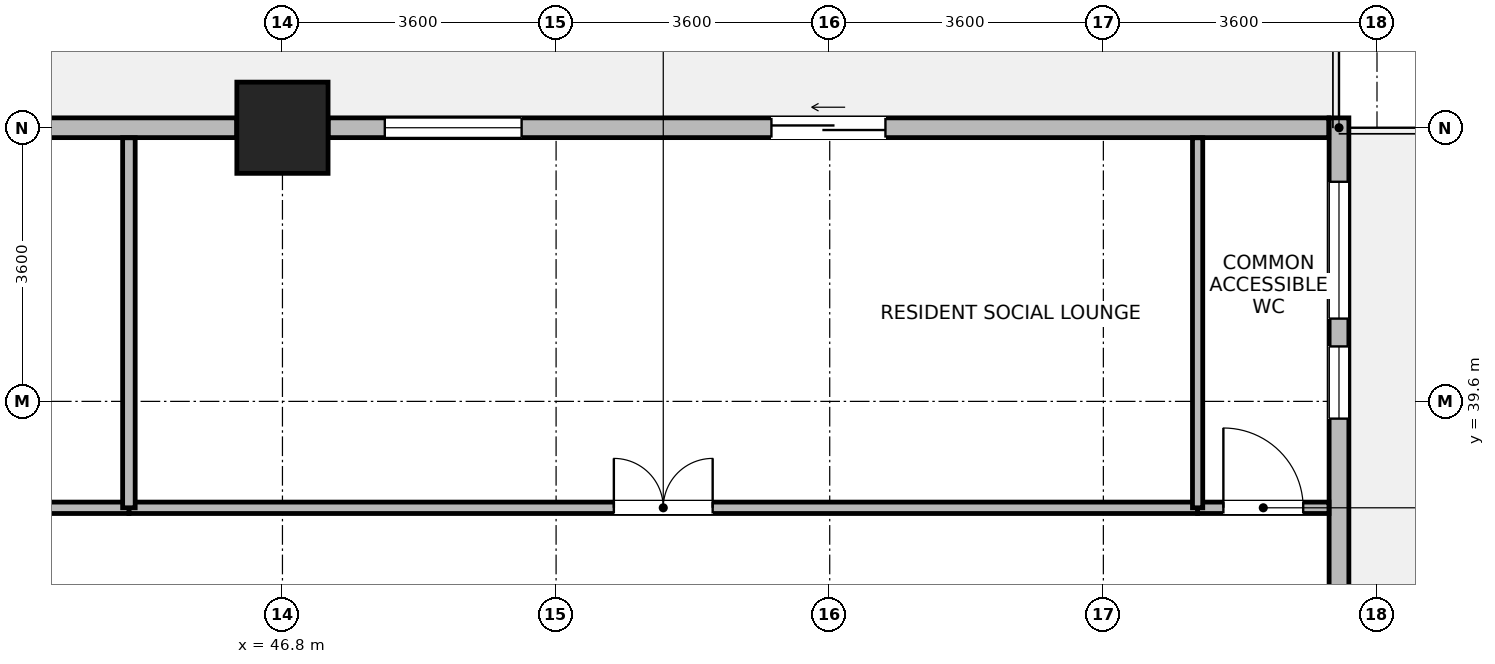
"""IFC4 building model, lengths in metres.
Left out: names, types, materials, properties, quantities, classifications, styles, units other than length and angle.
Written with IfcOpenShell. Run it as: python <this file> out.ifc"""

import sys

from ifc_helpers import new_model, si_unit, direction, frame, frame_2d, origin, origin_2d, place, context, subcontext, project, spatial, rectangle, extrude, source, transform, mapped, element, fill, save


model = new_model("IFC4")
c1 = context("Model", 3, precision=1e-05, world=origin(), true_north=direction((0.0, 1.0)))
c2 = subcontext(c1, "Body", "Model", "MODEL_VIEW")
j1 = project(units=[si_unit("LENGTHUNIT", "METRE"), si_unit("PLANEANGLEUNIT", "RADIAN")], contexts=[c1])
p1 = place(None, origin())
s1 = spatial("IfcSite", under=j1, at=p1, CompositionType="ELEMENT")
p2 = place(p1, origin())
s2 = spatial("IfcBuilding", under=s1, at=p2, CompositionType="ELEMENT")
p3 = place(p2, frame((0.0, 0.0, 104.5)))
s3 = spatial("IfcBuildingStorey", under=s2, at=p3, CompositionType="ELEMENT", Elevation=104.5)
m1 = source(origin(), c2, "Body", "SweptSolid", [
    extrude(rectangle(XDim=1.2, YDim=1.2, at=origin_2d()), origin(), (0.0, 0.0, 1.0), 3.7),
])
p4 = place(p3, frame((46.8, 43.2, 0.0), z_axis=(0.0, 0.0, 1.0), x_axis=(1.0, 0.0, 0.0)))
e1 = element("IfcColumn", 1, at=p4, inside=s3, PredefinedType="COLUMN", context=c2, shape_type="MappedRepresentation", body=[
    mapped(m1, transform((0.0, 0.0, 0.0), x_axis=(1.0, 0.0, 0.0), y_axis=(0.0, 1.0, 0.0), z_axis=(0.0, 0.0, 1.0), scale=1.0)),
])
p5 = place(p3, frame((60.7, 43.33, 0.0), z_axis=(0.0, 0.0, 1.0), x_axis=(0.0, -1.0, 0.0)))
e2 = element("IfcWall", 2, at=p5, inside=s3, PredefinedType="STANDARD", context=c2, shape_type="SweptSolid", body=[
    extrude(rectangle(XDim=6.964, YDim=0.26, at=frame_2d((3.482, 0.0))), origin(), (0.0, 0.0, 1.0), 3.43),
])
p6 = place(p5, frame((0.841, 0.0, 0.85)))
e3 = element("IfcOpeningElement", 3, at=p6, cuts=e2, PredefinedType="OPENING", context=c2, shape_type="SweptSolid", body=[
    extrude(rectangle(XDim=1.8, YDim=1.85, at=frame_2d((0.9, 0.925))), frame((0.0, 0.14, 0.0), z_axis=(0.0, -1.0, 0.0), x_axis=(1.0, 0.0, 0.0)), (0.0, 0.0, 1.0), 0.28),
])
p7 = place(p5, frame((3.007, 0.0, 0.85)))
e4 = element("IfcOpeningElement", 4, at=p7, cuts=e2, PredefinedType="OPENING", context=c2, shape_type="SweptSolid", body=[
    extrude(rectangle(XDim=0.95, YDim=1.75, at=frame_2d((0.475, 0.875))), frame((0.0, 0.14, 0.0), z_axis=(0.0, -1.0, 0.0), x_axis=(1.0, 0.0, 0.0)), (0.0, 0.0, 1.0), 0.28),
])
p8 = place(p3, frame((47.401, 43.2, 0.0), z_axis=(0.0, 0.0, 1.0), x_axis=(1.0, 0.0, 0.0)))
e5 = element("IfcWall", 5, at=p8, inside=s3, PredefinedType="STANDARD", context=c2, shape_type="SweptSolid", body=[
    extrude(rectangle(XDim=13.164, YDim=0.26, at=frame_2d((6.582, 0.0))), origin(), (0.0, 0.0, 1.0), 3.43),
])
p9 = place(p8, frame((5.832, 0.0, 0.0)))
e6 = element("IfcOpeningElement", 6, at=p9, cuts=e5, PredefinedType="OPENING", context=c2, shape_type="SweptSolid", body=[
    extrude(rectangle(XDim=1.5, YDim=2.15, at=frame_2d((0.75, 1.075))), frame((0.0, 0.14, 0.0), z_axis=(0.0, -1.0, 0.0), x_axis=(1.0, 0.0, 0.0)), (0.0, 0.0, 1.0), 0.28),
])
p10 = place(p8, frame((0.746, 0.0, 0.85)))
e7 = element("IfcOpeningElement", 7, at=p10, cuts=e5, PredefinedType="OPENING", context=c2, shape_type="SweptSolid", body=[
    extrude(rectangle(XDim=1.8, YDim=1.85, at=frame_2d((0.9, 0.925))), frame((0.0, 0.14, 0.0), z_axis=(0.0, -1.0, 0.0), x_axis=(1.0, 0.0, 0.0)), (0.0, 0.0, 1.0), 0.28),
])
p11 = place(p3, frame((36.601, 43.2, 0.0), z_axis=(0.0, 0.0, 1.0), x_axis=(1.0, 0.0, 0.0)))
e8 = element("IfcWall", 8, at=p11, inside=s3, PredefinedType="STANDARD", context=c2, shape_type="SweptSolid", body=[
    extrude(rectangle(XDim=9.598, YDim=0.26, at=frame_2d((4.799, 0.0))), origin(), (0.0, 0.0, 1.0), 2.98),
])
p12 = place(p11, frame((0.7, 0.0, 0.85)))
e9 = element("IfcOpeningElement", 9, at=p12, cuts=e8, PredefinedType="OPENING", context=c2, shape_type="SweptSolid", body=[
    extrude(rectangle(XDim=1.8, YDim=1.85, at=frame_2d((0.9, 0.925))), frame((0.0, 0.14, 0.0), z_axis=(0.0, -1.0, 0.0), x_axis=(1.0, 0.0, 0.0)), (0.0, 0.0, 1.0), 0.28),
])
p13 = place(p11, frame((3.899, 0.0, 0.85)))
e10 = element("IfcOpeningElement", 10, at=p13, cuts=e8, PredefinedType="OPENING", context=c2, shape_type="SweptSolid", body=[
    extrude(rectangle(XDim=1.8, YDim=1.85, at=frame_2d((0.9, 0.925))), frame((0.0, 0.14, 0.0), z_axis=(0.0, -1.0, 0.0), x_axis=(1.0, 0.0, 0.0)), (0.0, 0.0, 1.0), 0.28),
])
p14 = place(p3, frame((44.78, 38.2, 0.0), z_axis=(0.0, 0.0, 1.0), x_axis=(1.0, 0.0, 0.0)))
e11 = element("IfcWall", 11, at=p14, inside=s3, PredefinedType="PARTITIONING", context=c2, shape_type="SweptSolid", body=[
    extrude(rectangle(XDim=14.06, YDim=0.15, at=frame_2d((7.03, 0.0))), origin(), (0.0, 0.0, 1.0), 3.43),
])
p15 = place(p14, frame((6.38, 0.0, 0.0)))
e12 = element("IfcOpeningElement", 12, at=p15, cuts=e11, PredefinedType="OPENING", context=c2, shape_type="SweptSolid", body=[
    extrude(rectangle(XDim=1.3, YDim=2.12, at=frame_2d((0.65, 1.06))), frame((0.0, 0.085, 0.0), z_axis=(0.0, -1.0, 0.0), x_axis=(1.0, 0.0, 0.0)), (0.0, 0.0, 1.0), 0.17),
])
p16 = place(p3, frame((32.62, 38.2, 0.0), z_axis=(0.0, 0.0, 1.0), x_axis=(1.0, 0.0, 0.0)))
e13 = element("IfcWall", 13, at=p16, inside=s3, PredefinedType="PARTITIONING", context=c2, shape_type="SweptSolid", body=[
    extrude(rectangle(XDim=12.16, YDim=0.15, at=frame_2d((6.08, 0.0))), origin(), (0.0, 0.0, 1.0), 3.43),
])
p17 = place(p16, frame((5.63, 0.0, 0.0)))
e14 = element("IfcOpeningElement", 14, at=p17, cuts=e13, PredefinedType="OPENING", context=c2, shape_type="SweptSolid", body=[
    extrude(rectangle(XDim=0.9, YDim=2.08, at=frame_2d((0.45, 1.04))), frame((0.0, 0.085, 0.0), z_axis=(0.0, -1.0, 0.0), x_axis=(1.0, 0.0, 0.0)), (0.0, 0.0, 1.0), 0.17),
])
p18 = place(p3, frame((58.84, 38.2, 0.0), z_axis=(0.0, 0.0, 1.0), x_axis=(1.0, 0.0, 0.0)))
e15 = element("IfcWall", 15, at=p18, inside=s3, PredefinedType="PARTITIONING", context=c2, shape_type="SweptSolid", body=[
    extrude(rectangle(XDim=1.728, YDim=0.15, at=frame_2d((0.864, 0.0))), origin(), (0.0, 0.0, 1.0), 3.43),
])
p19 = place(p18, frame((0.339, 0.0, 0.0)))
e16 = element("IfcOpeningElement", 16, at=p19, cuts=e15, PredefinedType="OPENING", context=c2, shape_type="SweptSolid", body=[
    extrude(rectangle(XDim=1.05, YDim=2.12, at=frame_2d((0.525, 1.06))), frame((0.0, 0.085, 0.0), z_axis=(0.0, -1.0, 0.0), x_axis=(1.0, 0.0, 0.0)), (0.0, 0.0, 1.0), 0.17),
])
p20 = place(p3, frame((44.78, 38.2, 0.0), z_axis=(0.0, 0.0, 1.0), x_axis=(0.0, 1.0, 0.0)))
e17 = element("IfcWall", 17, at=p20, inside=s3, PredefinedType="PARTITIONING", context=c2, shape_type="SweptSolid", body=[
    extrude(rectangle(XDim=4.868, YDim=0.165, at=frame_2d((2.434, 0.0))), origin(), (0.0, 0.0, 1.0), 3.43),
])
p21 = place(p3, frame((58.84, 38.2, 0.0), z_axis=(0.0, 0.0, 1.0), x_axis=(0.0, 1.0, 0.0)))
e18 = element("IfcWall", 18, at=p21, inside=s3, PredefinedType="PARTITIONING", context=c2, shape_type="SweptSolid", body=[
    extrude(rectangle(XDim=4.868, YDim=0.135, at=frame_2d((2.434, 0.0))), origin(), (0.0, 0.0, 1.0), 3.43),
])
p22 = place(p6, origin())
e19 = element("IfcWindow", 19, at=p22, inside=s3, PartitioningType="SINGLE_PANEL", PredefinedType="WINDOW", context=c2, shape_type="SweptSolid", body=[
    extrude(rectangle(XDim=1.8, YDim=1.85, at=frame_2d((0.9, 0.925))), frame((0.0, 0.03, 0.0), z_axis=(0.0, -1.0, 0.0), x_axis=(1.0, 0.0, 0.0)), (0.0, 0.0, 1.0), 0.06),
])
fill(e3, e19)
p23 = place(p7, origin())
e20 = element("IfcWindow", 20, at=p23, inside=s3, PartitioningType="SINGLE_PANEL", PredefinedType="WINDOW", context=c2, shape_type="SweptSolid", body=[
    extrude(rectangle(XDim=0.95, YDim=1.75, at=frame_2d((0.475, 0.875))), frame((0.0, 0.03, 0.0), z_axis=(0.0, -1.0, 0.0), x_axis=(1.0, 0.0, 0.0)), (0.0, 0.0, 1.0), 0.06),
])
fill(e4, e20)
p24 = place(p9, origin())
e21 = element("IfcDoor", 21, at=p24, inside=s3, OperationType="SLIDING_TO_LEFT", PredefinedType="DOOR", context=c2, shape_type="SweptSolid", body=[
    extrude(rectangle(XDim=1.5, YDim=2.15, at=frame_2d((0.75, 1.075))), frame((0.0, 0.025, 0.0), z_axis=(0.0, -1.0, 0.0), x_axis=(1.0, 0.0, 0.0)), (0.0, 0.0, 1.0), 0.05),
])
fill(e6, e21)
p25 = place(p10, origin())
e22 = element("IfcWindow", 22, at=p25, inside=s3, PartitioningType="SINGLE_PANEL", PredefinedType="WINDOW", context=c2, shape_type="SweptSolid", body=[
    extrude(rectangle(XDim=1.8, YDim=1.85, at=frame_2d((0.9, 0.925))), frame((0.0, 0.03, 0.0), z_axis=(0.0, -1.0, 0.0), x_axis=(1.0, 0.0, 0.0)), (0.0, 0.0, 1.0), 0.06),
])
fill(e7, e22)
p26 = place(p15, origin())
e23 = element("IfcDoor", 23, at=p26, inside=s3, OperationType="DOUBLE_DOOR_SINGLE_SWING", PredefinedType="DOOR", context=c2, shape_type="SweptSolid", body=[
    extrude(rectangle(XDim=1.3, YDim=2.12, at=frame_2d((0.65, 1.06))), frame((0.0, 0.025, 0.0), z_axis=(0.0, -1.0, 0.0), x_axis=(1.0, 0.0, 0.0)), (0.0, 0.0, 1.0), 0.05),
])
fill(e12, e23)
p27 = place(p19, origin())
e24 = element("IfcDoor", 24, at=p27, inside=s3, OperationType="SINGLE_SWING_LEFT", PredefinedType="DOOR", context=c2, shape_type="SweptSolid", body=[
    extrude(rectangle(XDim=1.05, YDim=2.12, at=frame_2d((0.525, 1.06))), frame((0.0, 0.025, 0.0), z_axis=(0.0, -1.0, 0.0), x_axis=(1.0, 0.0, 0.0)), (0.0, 0.0, 1.0), 0.05),
])
fill(e16, e24)
save(model, sys.argv[1])
